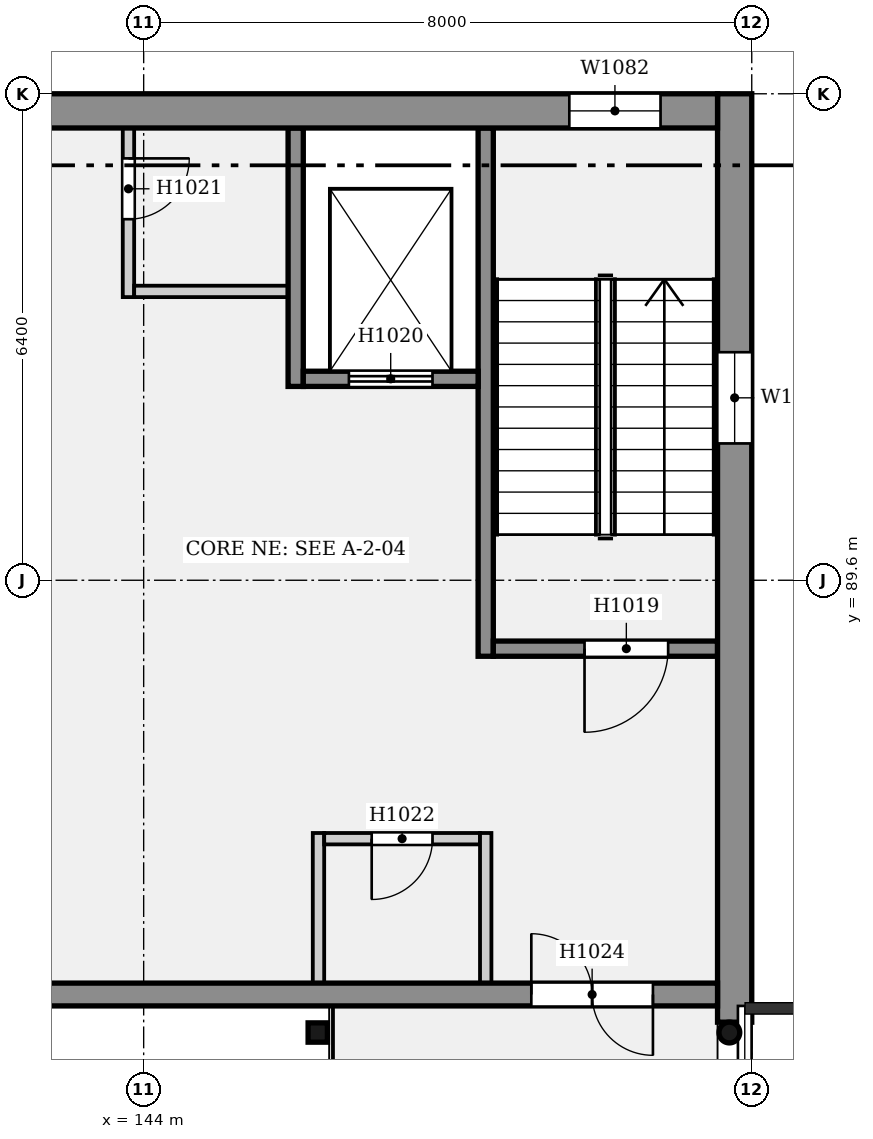
"""IFC4 building model, lengths in metres.
Left out: names, types, materials, properties, quantities, classifications, styles, units other than length and angle.
Written with IfcOpenShell. Run it as: python <this file> out.ifc"""

import sys

from ifc_helpers import new_model, si_unit, direction, frame, frame_2d, origin, origin_2d, place, context, subcontext, project, spatial, rectangle, hollow_rectangle, hollow_circle, extrude, element, fill, save


model = new_model("IFC4")
c1 = context("Model", 3, precision=1e-05, world=origin(), true_north=direction((0.0, 1.0)))
c2 = subcontext(c1, "Body", "Model", "MODEL_VIEW")
j1 = project(units=[si_unit("LENGTHUNIT", "METRE"), si_unit("PLANEANGLEUNIT", "RADIAN")], contexts=[c1])
p1 = place(None, origin())
s1 = spatial("IfcSite", under=j1, at=p1, CompositionType="ELEMENT")
p2 = place(p1, origin())
s2 = spatial("IfcBuilding", under=s1, at=p2, CompositionType="ELEMENT")
p3 = place(p2, frame((0.0, 0.0, 5.0)))
s3 = spatial("IfcBuildingStorey", under=s2, at=p3, CompositionType="ELEMENT", Elevation=5.0)
p4 = place(p3, frame((151.775, 96.0, 0.0), z_axis=(0.0, 0.0, 1.0), x_axis=(0.0, -1.0, 0.0)))
e1 = element("IfcWall", 1, at=p4, inside=s3, PredefinedType="ELEMENTEDWALL", context=c2, shape_type="SweptSolid", body=[
    extrude(rectangle(XDim=12.214, YDim=0.45, at=frame_2d((6.107, 0.0))), origin(), (0.0, 0.0, 1.0), 4.4),
])
p5 = place(p4, frame((3.4, 0.0, 0.6)))
e2 = element("IfcOpeningElement", 2, at=p5, cuts=e1, PredefinedType="OPENING", context=c2, shape_type="SweptSolid", body=[
    extrude(rectangle(XDim=1.2, YDim=3.0, at=frame_2d((0.6, 1.5))), frame((0.0, 0.235, 0.0), z_axis=(0.0, -1.0, 0.0), x_axis=(1.0, 0.0, 0.0)), (0.0, 0.0, 1.0), 0.47),
])
p6 = place(p3, frame((151.55, 95.775, 0.0), z_axis=(0.0, 0.0, 1.0), x_axis=(-1.0, 0.0, 0.0)))
e3 = element("IfcWall", 3, at=p6, inside=s3, PredefinedType="ELEMENTEDWALL", context=c2, shape_type="SweptSolid", body=[
    extrude(rectangle(XDim=11.764, YDim=0.45, at=frame_2d((5.882, 0.0))), origin(), (0.0, 0.0, 1.0), 4.4),
])
p7 = place(p6, frame((0.75, 0.0, 0.6)))
e4 = element("IfcOpeningElement", 4, at=p7, cuts=e3, PredefinedType="OPENING", context=c2, shape_type="SweptSolid", body=[
    extrude(rectangle(XDim=1.2, YDim=3.0, at=frame_2d((0.6, 1.5))), frame((0.0, 0.235, 0.0), z_axis=(0.0, -1.0, 0.0), x_axis=(1.0, 0.0, 0.0)), (0.0, 0.0, 1.0), 0.47),
])
p8 = place(p3, frame((151.55, 84.15, 0.0), z_axis=(0.0, 0.0, 1.0), x_axis=(-1.0, 0.0, 0.0)))
e5 = element("IfcWall", 5, at=p8, inside=s3, PredefinedType="SOLIDWALL", context=c2, shape_type="SweptSolid", body=[
    extrude(rectangle(XDim=11.55, YDim=0.3, at=frame_2d((5.775, 0.0))), origin(), (0.0, 0.0, 1.0), 4.4),
])
p9 = place(p8, frame((0.85, 0.0, 0.0)))
e6 = element("IfcOpeningElement", 6, at=p9, cuts=e5, PredefinedType="OPENING", context=c2, shape_type="SweptSolid", body=[
    extrude(rectangle(XDim=1.6, YDim=2.1, at=frame_2d((0.8, 1.05))), frame((0.0, 0.16, 0.0), z_axis=(0.0, -1.0, 0.0), x_axis=(1.0, 0.0, 0.0)), (0.0, 0.0, 1.0), 0.32),
])
p10 = place(p3, frame((151.706, 83.65, 0.027), z_axis=(0.19937683017, 0.0, 0.979922894717), x_axis=(0.0, 1.0, 0.0)))
e7 = element("IfcColumn", 7, at=p10, inside=s3, PredefinedType="COLUMN", context=c2, shape_type="SweptSolid", body=[
    extrude(hollow_circle(Radius=0.136, WallThickness=0.013, at=origin_2d()), origin(), (0.0, 0.0, 1.0), 4.462),
])
p11 = place(p3, frame((146.29, 83.65, 0.0), z_axis=(0.0, 0.0, 1.0), x_axis=(1.0, 0.0, 0.0)))
e8 = element("IfcColumn", 8, at=p11, inside=s3, PredefinedType="COLUMN", context=c2, shape_type="SweptSolid", body=[
    extrude(hollow_rectangle(XDim=0.254, YDim=0.254, WallThickness=0.016, InnerFilletRadius=0.008, OuterFilletRadius=0.024, at=origin_2d()), origin(), (0.0, 0.0, 1.0), 4.4),
])
p12 = place(p3, frame((148.5, 95.55, 0.0), z_axis=(0.0, 0.0, 1.0), x_axis=(0.0, -1.0, 0.0)))
e9 = element("IfcWall", 9, at=p12, inside=s3, PredefinedType="SOLIDWALL", context=c2, shape_type="SweptSolid", body=[
    extrude(rectangle(XDim=6.95, YDim=0.2, at=frame_2d((3.475, 0.0))), origin(), (0.0, 0.0, 1.0), 4.4),
])
p13 = place(p3, frame((151.55, 88.7, 0.0), z_axis=(0.0, 0.0, 1.0), x_axis=(-1.0, 0.0, 0.0)))
e10 = element("IfcWall", 10, at=p13, inside=s3, PredefinedType="SOLIDWALL", context=c2, shape_type="SweptSolid", body=[
    extrude(rectangle(XDim=2.95, YDim=0.2, at=frame_2d((1.475, 0.0))), origin(), (0.0, 0.0, 1.0), 4.4),
])
p14 = place(p13, frame((0.65, 0.0, 0.0)))
e11 = element("IfcOpeningElement", 11, at=p14, cuts=e10, PredefinedType="OPENING", context=c2, shape_type="SweptSolid", body=[
    extrude(rectangle(XDim=1.1, YDim=2.1, at=frame_2d((0.55, 1.05))), frame((0.0, 0.11, 0.0), z_axis=(0.0, -1.0, 0.0), x_axis=(1.0, 0.0, 0.0)), (0.0, 0.0, 1.0), 0.22),
])
p15 = place(p3, frame((146.0, 95.55, 0.0), z_axis=(0.0, 0.0, 1.0), x_axis=(0.0, -1.0, 0.0)))
e12 = element("IfcWall", 12, at=p15, inside=s3, PredefinedType="SOLIDWALL", context=c2, shape_type="SweptSolid", body=[
    extrude(rectangle(XDim=3.4, YDim=0.2, at=frame_2d((1.7, 0.0))), origin(), (0.0, 0.0, 1.0), 4.4),
])
p16 = place(p3, frame((148.4, 92.25, 0.0), z_axis=(0.0, 0.0, 1.0), x_axis=(-1.0, 0.0, 0.0)))
e13 = element("IfcWall", 13, at=p16, inside=s3, PredefinedType="SOLIDWALL", context=c2, shape_type="SweptSolid", body=[
    extrude(rectangle(XDim=2.3, YDim=0.2, at=frame_2d((1.15, 0.0))), origin(), (0.0, 0.0, 1.0), 4.4),
])
p17 = place(p16, frame((0.6, 0.0, 0.0)))
e14 = element("IfcOpeningElement", 14, at=p17, cuts=e13, PredefinedType="OPENING", context=c2, shape_type="SweptSolid", body=[
    extrude(rectangle(XDim=1.1, YDim=2.1, at=frame_2d((0.55, 1.05))), frame((0.0, 0.11, 0.0), z_axis=(0.0, -1.0, 0.0), x_axis=(1.0, 0.0, 0.0)), (0.0, 0.0, 1.0), 0.22),
])
p18 = place(p3, frame((145.9, 93.4, 0.0), z_axis=(0.0, 0.0, 1.0), x_axis=(-1.0, 0.0, 0.0)))
e15 = element("IfcWall", 15, at=p18, inside=s3, PredefinedType="PARTITIONING", context=c2, shape_type="SweptSolid", body=[
    extrude(rectangle(XDim=2.025, YDim=0.15, at=frame_2d((1.012, 0.0))), origin(), (0.0, 0.0, 1.0), 4.15),
])
p19 = place(p3, frame((143.8, 95.55, 0.0), z_axis=(0.0, 0.0, 1.0), x_axis=(0.0, -1.0, 0.0)))
e16 = element("IfcWall", 16, at=p19, inside=s3, PredefinedType="PARTITIONING", context=c2, shape_type="SweptSolid", body=[
    extrude(rectangle(XDim=2.225, YDim=0.15, at=frame_2d((1.113, 0.0))), origin(), (0.0, 0.0, 1.0), 4.15),
])
p20 = place(p19, frame((0.4, 0.0, 0.0)))
e17 = element("IfcOpeningElement", 17, at=p20, cuts=e16, PredefinedType="OPENING", context=c2, shape_type="SweptSolid", body=[
    extrude(rectangle(XDim=0.8, YDim=2.1, at=frame_2d((0.4, 1.05))), frame((0.0, 0.085, 0.0), z_axis=(0.0, -1.0, 0.0), x_axis=(1.0, 0.0, 0.0)), (0.0, 0.0, 1.0), 0.17),
])
p21 = place(p3, frame((148.425, 86.2, 0.0), z_axis=(0.0, 0.0, 1.0), x_axis=(-1.0, 0.0, 0.0)))
e18 = element("IfcWall", 18, at=p21, inside=s3, PredefinedType="PARTITIONING", context=c2, shape_type="SweptSolid", body=[
    extrude(rectangle(XDim=2.05, YDim=0.15, at=frame_2d((1.025, 0.0))), origin(), (0.0, 0.0, 1.0), 4.15),
])
p22 = place(p21, frame((0.625, 0.0, 0.0)))
e19 = element("IfcOpeningElement", 19, at=p22, cuts=e18, PredefinedType="OPENING", context=c2, shape_type="SweptSolid", body=[
    extrude(rectangle(XDim=0.8, YDim=2.1, at=frame_2d((0.4, 1.05))), frame((0.0, 0.085, 0.0), z_axis=(0.0, -1.0, 0.0), x_axis=(1.0, 0.0, 0.0)), (0.0, 0.0, 1.0), 0.17),
])
for number, where, z_axis, x_axis in (
    (20, (148.5, 86.275, 0.0), (0.0, 0.0, 1.0), (0.0, -1.0, 0.0)),
    (21, (146.3, 86.275, 0.0), (0.0, 0.0, 1.0), (0.0, -1.0, 0.0)),
):
    element("IfcWall", number, at=place(p3, frame(where, z_axis=z_axis, x_axis=x_axis)), inside=s3, PredefinedType="PARTITIONING", context=c2, shape_type="SweptSolid", body=[
        extrude(rectangle(XDim=1.975, YDim=0.15, at=frame_2d((0.987, 0.0))), origin(), (0.0, 0.0, 1.0), 4.15),
    ])
p23 = place(p14, origin())
e22 = element("IfcDoor", 22, at=p23, inside=s3, OperationType="SINGLE_SWING_RIGHT", PredefinedType="DOOR", context=c2, shape_type="SweptSolid", body=[
    extrude(rectangle(XDim=1.1, YDim=2.1, at=frame_2d((0.55, 1.05))), frame((0.0, 0.025, 0.0), z_axis=(0.0, -1.0, 0.0), x_axis=(1.0, 0.0, 0.0)), (0.0, 0.0, 1.0), 0.05),
])
fill(e11, e22)
p24 = place(p17, origin())
e23 = element("IfcDoor", 23, at=p24, inside=s3, OperationType="DOUBLE_DOOR_SLIDING", PredefinedType="DOOR", context=c2, shape_type="SweptSolid", body=[
    extrude(rectangle(XDim=1.1, YDim=2.1, at=frame_2d((0.55, 1.05))), frame((0.0, 0.025, 0.0), z_axis=(0.0, -1.0, 0.0), x_axis=(1.0, 0.0, 0.0)), (0.0, 0.0, 1.0), 0.05),
])
fill(e14, e23)
p25 = place(p20, origin())
e24 = element("IfcDoor", 24, at=p25, inside=s3, OperationType="SINGLE_SWING_LEFT", PredefinedType="DOOR", context=c2, shape_type="SweptSolid", body=[
    extrude(rectangle(XDim=0.8, YDim=2.1, at=frame_2d((0.4, 1.05))), frame((0.0, 0.025, 0.0), z_axis=(0.0, -1.0, 0.0), x_axis=(1.0, 0.0, 0.0)), (0.0, 0.0, 1.0), 0.05),
])
fill(e17, e24)
p26 = place(p22, origin())
e25 = element("IfcDoor", 25, at=p26, inside=s3, OperationType="SINGLE_SWING_RIGHT", PredefinedType="DOOR", context=c2, shape_type="SweptSolid", body=[
    extrude(rectangle(XDim=0.8, YDim=2.1, at=frame_2d((0.4, 1.05))), frame((0.0, 0.025, 0.0), z_axis=(0.0, -1.0, 0.0), x_axis=(1.0, 0.0, 0.0)), (0.0, 0.0, 1.0), 0.05),
])
fill(e19, e25)
p27 = place(p9, origin())
e26 = element("IfcDoor", 26, at=p27, inside=s3, OperationType="DOUBLE_DOOR_SINGLE_SWING", PredefinedType="DOOR", context=c2, shape_type="SweptSolid", body=[
    extrude(rectangle(XDim=1.6, YDim=2.1, at=frame_2d((0.8, 1.05))), frame((0.0, 0.025, 0.0), z_axis=(0.0, -1.0, 0.0), x_axis=(1.0, 0.0, 0.0)), (0.0, 0.0, 1.0), 0.05),
])
fill(e6, e26)
p28 = place(p5, origin())
e27 = element("IfcWindow", 27, at=p28, inside=s3, PartitioningType="SINGLE_PANEL", PredefinedType="WINDOW", context=c2, shape_type="SweptSolid", body=[
    extrude(rectangle(XDim=1.2, YDim=3.0, at=frame_2d((0.6, 1.5))), frame((0.0, 0.03, 0.0), z_axis=(0.0, -1.0, 0.0), x_axis=(1.0, 0.0, 0.0)), (0.0, 0.0, 1.0), 0.06),
])
fill(e2, e27)
p29 = place(p7, origin())
e28 = element("IfcWindow", 28, at=p29, inside=s3, PartitioningType="SINGLE_PANEL", PredefinedType="WINDOW", context=c2, shape_type="SweptSolid", body=[
    extrude(rectangle(XDim=1.2, YDim=3.0, at=frame_2d((0.6, 1.5))), frame((0.0, 0.03, 0.0), z_axis=(0.0, -1.0, 0.0), x_axis=(1.0, 0.0, 0.0)), (0.0, 0.0, 1.0), 0.06),
])
fill(e4, e28)
save(model, sys.argv[1])
